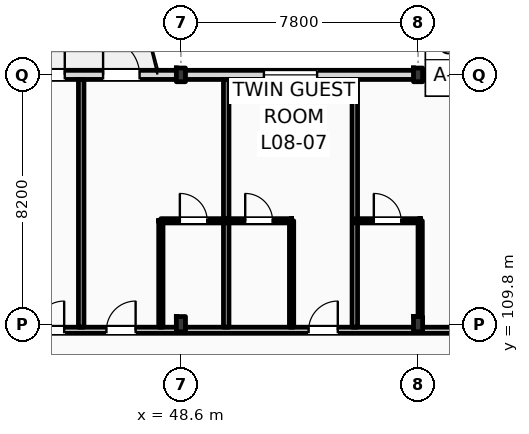
"""IFC4 building model, lengths in metres.
Left out: names, types, materials, properties, quantities, classifications, styles, units other than length and angle.
Written with IfcOpenShell. Run it as: python <this file> out.ifc"""

import sys

from ifc_helpers import new_model, si_unit, direction, frame, frame_2d, origin, origin_2d, place, context, subcontext, project, spatial, rectangle, i_section, extrude, element, fill, save


model = new_model("IFC4")
c1 = context("Model", 3, precision=1e-05, world=origin(), true_north=direction((0.0, 1.0)))
c2 = subcontext(c1, "Body", "Model", "MODEL_VIEW")
j1 = project(units=[si_unit("LENGTHUNIT", "METRE"), si_unit("PLANEANGLEUNIT", "RADIAN")], contexts=[c1])
p1 = place(None, origin())
s1 = spatial("IfcSite", under=j1, at=p1, CompositionType="ELEMENT")
p2 = place(p1, origin())
s2 = spatial("IfcBuilding", under=s1, at=p2, CompositionType="ELEMENT")
p3 = place(p2, frame((0.0, 0.0, 35.4)))
s3 = spatial("IfcBuildingStorey", under=s2, at=p3, CompositionType="ELEMENT", Elevation=35.4)
p4 = place(p3, frame((48.6, 109.8, 0.0), z_axis=(0.0, 0.0, 1.0), x_axis=(1.0, 0.0, 0.0)))
e1 = element("IfcColumn", 1, at=p4, inside=s3, PredefinedType="COLUMN", context=c2, shape_type="SweptSolid", body=[
    extrude(i_section(OverallWidth=0.3, OverallDepth=0.5, WebThickness=0.014, FlangeThickness=0.028, FilletRadius=0.027, at=origin_2d()), origin(), (0.0, 0.0, 1.0), 3.6),
])
p5 = place(p3, frame((48.6, 118.0, 0.0), z_axis=(0.0, 0.0, 1.0), x_axis=(1.0, 0.0, 0.0)))
e2 = element("IfcColumn", 2, at=p5, inside=s3, PredefinedType="COLUMN", context=c2, shape_type="SweptSolid", body=[
    extrude(i_section(OverallWidth=0.3, OverallDepth=0.45, WebThickness=0.014, FlangeThickness=0.026, FilletRadius=0.027, at=origin_2d()), origin(), (0.0, 0.0, 1.0), 3.6),
])
p6 = place(p3, frame((56.4, 109.8, 0.0), z_axis=(0.0, 0.0, 1.0), x_axis=(1.0, 0.0, 0.0)))
e3 = element("IfcColumn", 3, at=p6, inside=s3, PredefinedType="COLUMN", context=c2, shape_type="SweptSolid", body=[
    extrude(i_section(OverallWidth=0.3, OverallDepth=0.5, WebThickness=0.014, FlangeThickness=0.028, FilletRadius=0.027, at=origin_2d()), origin(), (0.0, 0.0, 1.0), 3.6),
])
p7 = place(p3, frame((56.4, 118.0, 0.0), z_axis=(0.0, 0.0, 1.0), x_axis=(1.0, 0.0, 0.0)))
e4 = element("IfcColumn", 4, at=p7, inside=s3, PredefinedType="COLUMN", context=c2, shape_type="SweptSolid", body=[
    extrude(i_section(OverallWidth=0.3, OverallDepth=0.45, WebThickness=0.014, FlangeThickness=0.026, FilletRadius=0.027, at=origin_2d()), origin(), (0.0, 0.0, 1.0), 3.6),
])
p8 = place(p3, frame((22.5, 118.0, 0.0), z_axis=(0.0, 0.0, 1.0), x_axis=(1.0, 0.0, 0.0)))
e5 = element("IfcWall", 5, at=p8, inside=s3, PredefinedType="STANDARD", context=c2, shape_type="SweptSolid", body=[
    extrude(rectangle(XDim=72.9, YDim=0.3, at=frame_2d((36.45, 0.0))), origin(), (0.0, 0.0, 1.0), 2.92),
])
p9 = place(p8, frame((0.91, 0.0, 0.9)))
e6 = element("IfcOpeningElement", 6, at=p9, cuts=e5, PredefinedType="OPENING", context=c2, shape_type="SweptSolid", body=[
    extrude(rectangle(XDim=0.9, YDim=1.84, at=frame_2d((0.45, 0.92))), frame((0.0, 0.16, 0.0), z_axis=(0.0, -1.0, 0.0), x_axis=(1.0, 0.0, 0.0)), (0.0, 0.0, 1.0), 0.32),
])
p10 = place(p8, frame((6.665, 0.0, 0.0)))
e7 = element("IfcOpeningElement", 7, at=p10, cuts=e5, PredefinedType="OPENING", context=c2, shape_type="SweptSolid", body=[
    extrude(rectangle(XDim=1.2, YDim=2.25, at=frame_2d((0.6, 1.125))), frame((0.0, 0.16, 0.0), z_axis=(0.0, -1.0, 0.0), x_axis=(1.0, 0.0, 0.0)), (0.0, 0.0, 1.0), 0.32),
])
p11 = place(p8, frame((11.355, 0.0, 0.9)))
e8 = element("IfcOpeningElement", 8, at=p11, cuts=e5, PredefinedType="OPENING", context=c2, shape_type="SweptSolid", body=[
    extrude(rectangle(XDim=1.1, YDim=1.5, at=frame_2d((0.55, 0.75))), frame((0.0, 0.16, 0.0), z_axis=(0.0, -1.0, 0.0), x_axis=(1.0, 0.0, 0.0)), (0.0, 0.0, 1.0), 0.32),
])
p12 = place(p8, frame((15.58, 0.0, 0.9)))
e9 = element("IfcOpeningElement", 9, at=p12, cuts=e5, PredefinedType="OPENING", context=c2, shape_type="SweptSolid", body=[
    extrude(rectangle(XDim=1.25, YDim=1.6, at=frame_2d((0.625, 0.8))), frame((0.0, 0.16, 0.0), z_axis=(0.0, -1.0, 0.0), x_axis=(1.0, 0.0, 0.0)), (0.0, 0.0, 1.0), 0.32),
])
p13 = place(p8, frame((21.08, 0.0, 0.0)))
e10 = element("IfcOpeningElement", 10, at=p13, cuts=e5, PredefinedType="OPENING", context=c2, shape_type="SweptSolid", body=[
    extrude(rectangle(XDim=1.2, YDim=2.25, at=frame_2d((0.6, 1.125))), frame((0.0, 0.16, 0.0), z_axis=(0.0, -1.0, 0.0), x_axis=(1.0, 0.0, 0.0)), (0.0, 0.0, 1.0), 0.32),
])
p14 = place(p8, frame((23.54, 0.0, 0.0)))
e11 = element("IfcOpeningElement", 11, at=p14, cuts=e5, PredefinedType="OPENING", context=c2, shape_type="SweptSolid", body=[
    extrude(rectangle(XDim=1.2, YDim=2.25, at=frame_2d((0.6, 1.125))), frame((0.0, 0.16, 0.0), z_axis=(0.0, -1.0, 0.0), x_axis=(1.0, 0.0, 0.0)), (0.0, 0.0, 1.0), 0.32),
])
p15 = place(p8, frame((28.83, 0.0, 0.9)))
e12 = element("IfcOpeningElement", 12, at=p15, cuts=e5, PredefinedType="OPENING", context=c2, shape_type="SweptSolid", body=[
    extrude(rectangle(XDim=1.75, YDim=1.84, at=frame_2d((0.875, 0.92))), frame((0.0, 0.16, 0.0), z_axis=(0.0, -1.0, 0.0), x_axis=(1.0, 0.0, 0.0)), (0.0, 0.0, 1.0), 0.32),
])
p16 = place(p8, frame((34.805, 0.0, 0.9)))
e13 = element("IfcOpeningElement", 13, at=p16, cuts=e5, PredefinedType="OPENING", context=c2, shape_type="SweptSolid", body=[
    extrude(rectangle(XDim=1.35, YDim=1.84, at=frame_2d((0.675, 0.92))), frame((0.0, 0.16, 0.0), z_axis=(0.0, -1.0, 0.0), x_axis=(1.0, 0.0, 0.0)), (0.0, 0.0, 1.0), 0.32),
])
p17 = place(p8, frame((38.105, 0.0, 0.0)))
e14 = element("IfcOpeningElement", 14, at=p17, cuts=e5, PredefinedType="OPENING", context=c2, shape_type="SweptSolid", body=[
    extrude(rectangle(XDim=1.2, YDim=2.25, at=frame_2d((0.6, 1.125))), frame((0.0, 0.16, 0.0), z_axis=(0.0, -1.0, 0.0), x_axis=(1.0, 0.0, 0.0)), (0.0, 0.0, 1.0), 0.32),
])
p18 = place(p8, frame((42.505, 0.0, 0.9)))
e15 = element("IfcOpeningElement", 15, at=p18, cuts=e5, PredefinedType="OPENING", context=c2, shape_type="SweptSolid", body=[
    extrude(rectangle(XDim=2.6, YDim=1.84, at=frame_2d((1.3, 0.92))), frame((0.0, 0.16, 0.0), z_axis=(0.0, -1.0, 0.0), x_axis=(1.0, 0.0, 0.0)), (0.0, 0.0, 1.0), 0.32),
])
p19 = place(p8, frame((46.2, 0.0, 0.9)))
e16 = element("IfcOpeningElement", 16, at=p19, cuts=e5, PredefinedType="OPENING", context=c2, shape_type="SweptSolid", body=[
    extrude(rectangle(XDim=1.8, YDim=1.84, at=frame_2d((0.9, 0.92))), frame((0.0, 0.16, 0.0), z_axis=(0.0, -1.0, 0.0), x_axis=(1.0, 0.0, 0.0)), (0.0, 0.0, 1.0), 0.32),
])
p20 = place(p8, frame((52.565, 0.0, 0.0)))
e17 = element("IfcOpeningElement", 17, at=p20, cuts=e5, PredefinedType="OPENING", context=c2, shape_type="SweptSolid", body=[
    extrude(rectangle(XDim=1.2, YDim=2.25, at=frame_2d((0.6, 1.125))), frame((0.0, 0.16, 0.0), z_axis=(0.0, -1.0, 0.0), x_axis=(1.0, 0.0, 0.0)), (0.0, 0.0, 1.0), 0.32),
])
p21 = place(p8, frame((55.305, 0.0, 0.9)))
e18 = element("IfcOpeningElement", 18, at=p21, cuts=e5, PredefinedType="OPENING", context=c2, shape_type="SweptSolid", body=[
    extrude(rectangle(XDim=1.2, YDim=1.8, at=frame_2d((0.6, 0.9))), frame((0.0, 0.16, 0.0), z_axis=(0.0, -1.0, 0.0), x_axis=(1.0, 0.0, 0.0)), (0.0, 0.0, 1.0), 0.32),
])
p22 = place(p8, frame((60.53, 0.0, 0.9)))
e19 = element("IfcOpeningElement", 19, at=p22, cuts=e5, PredefinedType="OPENING", context=c2, shape_type="SweptSolid", body=[
    extrude(rectangle(XDim=1.35, YDim=1.84, at=frame_2d((0.675, 0.92))), frame((0.0, 0.16, 0.0), z_axis=(0.0, -1.0, 0.0), x_axis=(1.0, 0.0, 0.0)), (0.0, 0.0, 1.0), 0.32),
])
p23 = place(p8, frame((65.955, 0.0, 0.9)))
e20 = element("IfcOpeningElement", 20, at=p23, cuts=e5, PredefinedType="OPENING", context=c2, shape_type="SweptSolid", body=[
    extrude(rectangle(XDim=1.35, YDim=1.84, at=frame_2d((0.675, 0.92))), frame((0.0, 0.16, 0.0), z_axis=(0.0, -1.0, 0.0), x_axis=(1.0, 0.0, 0.0)), (0.0, 0.0, 1.0), 0.32),
])
p24 = place(p8, frame((69.335, 0.0, 0.9)))
e21 = element("IfcOpeningElement", 21, at=p24, cuts=e5, PredefinedType="OPENING", context=c2, shape_type="SweptSolid", body=[
    extrude(rectangle(XDim=1.65, YDim=1.84, at=frame_2d((0.825, 0.92))), frame((0.0, 0.16, 0.0), z_axis=(0.0, -1.0, 0.0), x_axis=(1.0, 0.0, 0.0)), (0.0, 0.0, 1.0), 0.32),
])
p25 = place(p3, frame((10.65, 109.6, 0.0), z_axis=(0.0, 0.0, 1.0), x_axis=(1.0, 0.0, 0.0)))
e22 = element("IfcWall", 22, at=p25, inside=s3, PredefinedType="PARTITIONING", context=c2, shape_type="SweptSolid", body=[
    extrude(rectangle(XDim=84.61, YDim=0.2, at=frame_2d((42.305, 0.0))), origin(), (0.0, 0.0, 1.0), 2.82),
])
p26 = place(p25, frame((12.675, 0.0, 0.0)))
e23 = element("IfcOpeningElement", 23, at=p26, cuts=e22, PredefinedType="OPENING", context=c2, shape_type="SweptSolid", body=[
    extrude(rectangle(XDim=1.02, YDim=2.2, at=frame_2d((0.51, 1.1))), frame((0.0, 0.11, 0.0), z_axis=(0.0, -1.0, 0.0), x_axis=(1.0, 0.0, 0.0)), (0.0, 0.0, 1.0), 0.22),
])
p27 = place(p25, frame((19.62, 0.0, 0.0)))
e24 = element("IfcOpeningElement", 24, at=p27, cuts=e22, PredefinedType="OPENING", context=c2, shape_type="SweptSolid", body=[
    extrude(rectangle(XDim=1.02, YDim=2.2, at=frame_2d((0.51, 1.1))), frame((0.0, 0.11, 0.0), z_axis=(0.0, -1.0, 0.0), x_axis=(1.0, 0.0, 0.0)), (0.0, 0.0, 1.0), 0.22),
])
p28 = place(p25, frame((24.12, 0.0, 0.0)))
e25 = element("IfcOpeningElement", 25, at=p28, cuts=e22, PredefinedType="OPENING", context=c2, shape_type="SweptSolid", body=[
    extrude(rectangle(XDim=1.02, YDim=2.2, at=frame_2d((0.51, 1.1))), frame((0.0, 0.11, 0.0), z_axis=(0.0, -1.0, 0.0), x_axis=(1.0, 0.0, 0.0)), (0.0, 0.0, 1.0), 0.22),
])
p29 = place(p25, frame((26.47, 0.0, 0.0)))
e26 = element("IfcOpeningElement", 26, at=p29, cuts=e22, PredefinedType="OPENING", context=c2, shape_type="SweptSolid", body=[
    extrude(rectangle(XDim=1.02, YDim=2.2, at=frame_2d((0.51, 1.1))), frame((0.0, 0.11, 0.0), z_axis=(0.0, -1.0, 0.0), x_axis=(1.0, 0.0, 0.0)), (0.0, 0.0, 1.0), 0.22),
])
p30 = place(p25, frame((33.15, 0.0, 0.0)))
e27 = element("IfcOpeningElement", 27, at=p30, cuts=e22, PredefinedType="OPENING", context=c2, shape_type="SweptSolid", body=[
    extrude(rectangle(XDim=0.96, YDim=2.2, at=frame_2d((0.48, 1.1))), frame((0.0, 0.11, 0.0), z_axis=(0.0, -1.0, 0.0), x_axis=(1.0, 0.0, 0.0)), (0.0, 0.0, 1.0), 0.22),
])
p31 = place(p25, frame((35.5, 0.0, 0.0)))
e28 = element("IfcOpeningElement", 28, at=p31, cuts=e22, PredefinedType="OPENING", context=c2, shape_type="SweptSolid", body=[
    extrude(rectangle(XDim=0.96, YDim=2.2, at=frame_2d((0.48, 1.1))), frame((0.0, 0.11, 0.0), z_axis=(0.0, -1.0, 0.0), x_axis=(1.0, 0.0, 0.0)), (0.0, 0.0, 1.0), 0.22),
])
p32 = place(p25, frame((42.15, 0.0, 0.0)))
e29 = element("IfcOpeningElement", 29, at=p32, cuts=e22, PredefinedType="OPENING", context=c2, shape_type="SweptSolid", body=[
    extrude(rectangle(XDim=0.96, YDim=2.2, at=frame_2d((0.48, 1.1))), frame((0.0, 0.11, 0.0), z_axis=(0.0, -1.0, 0.0), x_axis=(1.0, 0.0, 0.0)), (0.0, 0.0, 1.0), 0.22),
])
p33 = place(p25, frame((47.15, 0.0, 0.0)))
e30 = element("IfcOpeningElement", 30, at=p33, cuts=e22, PredefinedType="OPENING", context=c2, shape_type="SweptSolid", body=[
    extrude(rectangle(XDim=0.96, YDim=2.2, at=frame_2d((0.48, 1.1))), frame((0.0, 0.11, 0.0), z_axis=(0.0, -1.0, 0.0), x_axis=(1.0, 0.0, 0.0)), (0.0, 0.0, 1.0), 0.22),
])
p34 = place(p25, frame((51.15, 0.0, 0.0)))
e31 = element("IfcOpeningElement", 31, at=p34, cuts=e22, PredefinedType="OPENING", context=c2, shape_type="SweptSolid", body=[
    extrude(rectangle(XDim=0.96, YDim=2.2, at=frame_2d((0.48, 1.1))), frame((0.0, 0.11, 0.0), z_axis=(0.0, -1.0, 0.0), x_axis=(1.0, 0.0, 0.0)), (0.0, 0.0, 1.0), 0.22),
])
p35 = place(p25, frame((55.65, 0.0, 0.0)))
e32 = element("IfcOpeningElement", 32, at=p35, cuts=e22, PredefinedType="OPENING", context=c2, shape_type="SweptSolid", body=[
    extrude(rectangle(XDim=0.96, YDim=2.2, at=frame_2d((0.48, 1.1))), frame((0.0, 0.11, 0.0), z_axis=(0.0, -1.0, 0.0), x_axis=(1.0, 0.0, 0.0)), (0.0, 0.0, 1.0), 0.22),
])
p36 = place(p25, frame((58.0, 0.0, 0.0)))
e33 = element("IfcOpeningElement", 33, at=p36, cuts=e22, PredefinedType="OPENING", context=c2, shape_type="SweptSolid", body=[
    extrude(rectangle(XDim=0.96, YDim=2.2, at=frame_2d((0.48, 1.1))), frame((0.0, 0.11, 0.0), z_axis=(0.0, -1.0, 0.0), x_axis=(1.0, 0.0, 0.0)), (0.0, 0.0, 1.0), 0.22),
])
p37 = place(p25, frame((64.65, 0.0, 0.0)))
e34 = element("IfcOpeningElement", 34, at=p37, cuts=e22, PredefinedType="OPENING", context=c2, shape_type="SweptSolid", body=[
    extrude(rectangle(XDim=0.96, YDim=2.2, at=frame_2d((0.48, 1.1))), frame((0.0, 0.11, 0.0), z_axis=(0.0, -1.0, 0.0), x_axis=(1.0, 0.0, 0.0)), (0.0, 0.0, 1.0), 0.22),
])
p38 = place(p25, frame((66.75, 0.0, 0.0)))
e35 = element("IfcOpeningElement", 35, at=p38, cuts=e22, PredefinedType="OPENING", context=c2, shape_type="SweptSolid", body=[
    extrude(rectangle(XDim=0.96, YDim=2.2, at=frame_2d((0.48, 1.1))), frame((0.0, 0.11, 0.0), z_axis=(0.0, -1.0, 0.0), x_axis=(1.0, 0.0, 0.0)), (0.0, 0.0, 1.0), 0.22),
])
p39 = place(p25, frame((73.65, 0.0, 0.0)))
e36 = element("IfcOpeningElement", 36, at=p39, cuts=e22, PredefinedType="OPENING", context=c2, shape_type="SweptSolid", body=[
    extrude(rectangle(XDim=0.96, YDim=2.2, at=frame_2d((0.48, 1.1))), frame((0.0, 0.11, 0.0), z_axis=(0.0, -1.0, 0.0), x_axis=(1.0, 0.0, 0.0)), (0.0, 0.0, 1.0), 0.22),
])
p40 = place(p25, frame((78.4, 0.0, 0.0)))
e37 = element("IfcOpeningElement", 37, at=p40, cuts=e22, PredefinedType="OPENING", context=c2, shape_type="SweptSolid", body=[
    extrude(rectangle(XDim=0.96, YDim=2.2, at=frame_2d((0.48, 1.1))), frame((0.0, 0.11, 0.0), z_axis=(0.0, -1.0, 0.0), x_axis=(1.0, 0.0, 0.0)), (0.0, 0.0, 1.0), 0.22),
])
p41 = place(p25, frame((80.455, 0.0, 0.0)))
e38 = element("IfcOpeningElement", 38, at=p41, cuts=e22, PredefinedType="OPENING", context=c2, shape_type="SweptSolid", body=[
    extrude(rectangle(XDim=0.96, YDim=2.2, at=frame_2d((0.48, 1.1))), frame((0.0, 0.11, 0.0), z_axis=(0.0, -1.0, 0.0), x_axis=(1.0, 0.0, 0.0)), (0.0, 0.0, 1.0), 0.22),
])
p42 = place(p25, frame((2.716, 0.0, 0.0)))
e39 = element("IfcOpeningElement", 39, at=p42, cuts=e22, PredefinedType="OPENING", context=c2, shape_type="SweptSolid", body=[
    extrude(rectangle(XDim=1.35, YDim=2.25, at=frame_2d((0.675, 1.125))), frame((0.0, 0.11, 0.0), z_axis=(0.0, -1.0, 0.0), x_axis=(1.0, 0.0, 0.0)), (0.0, 0.0, 1.0), 0.22),
])
p43 = place(p25, frame((6.65, 0.0, 0.0)))
e40 = element("IfcOpeningElement", 40, at=p43, cuts=e22, PredefinedType="OPENING", context=c2, shape_type="SweptSolid", body=[
    extrude(rectangle(XDim=1.35, YDim=2.25, at=frame_2d((0.675, 1.125))), frame((0.0, 0.11, 0.0), z_axis=(0.0, -1.0, 0.0), x_axis=(1.0, 0.0, 0.0)), (0.0, 0.0, 1.0), 0.22),
])
p44 = place(p25, frame((10.583, 0.0, 0.0)))
e41 = element("IfcOpeningElement", 41, at=p44, cuts=e22, PredefinedType="OPENING", context=c2, shape_type="SweptSolid", body=[
    extrude(rectangle(XDim=1.35, YDim=2.25, at=frame_2d((0.675, 1.125))), frame((0.0, 0.11, 0.0), z_axis=(0.0, -1.0, 0.0), x_axis=(1.0, 0.0, 0.0)), (0.0, 0.0, 1.0), 0.22),
])
for number, where, z_axis, x_axis in (
    (42, (45.32, 109.7, 0.0), (0.0, 0.0, 1.0), (0.0, 1.0, 0.0)),
    (43, (50.09, 109.7, 0.0), (0.0, 0.0, 1.0), (0.0, 1.0, 0.0)),
):
    element("IfcWall", number, at=place(p3, frame(where, z_axis=z_axis, x_axis=x_axis)), inside=s3, PredefinedType="PARTITIONING", context=c2, shape_type="SweptSolid", body=[
        extrude(rectangle(XDim=8.15, YDim=0.18, at=frame_2d((4.075, 0.0))), origin(), (0.0, 0.0, 1.0), 3.38),
    ])
p45 = place(p3, frame((47.94, 109.7, 0.0), z_axis=(0.0, 0.0, 1.0), x_axis=(0.0, 1.0, 0.0)))
e44 = element("IfcWall", 44, at=p45, inside=s3, PredefinedType="PARTITIONING", context=c2, shape_type="SweptSolid", body=[
    extrude(rectangle(XDim=3.5, YDim=0.14, at=frame_2d((1.75, 0.0))), origin(), (0.0, 0.0, 1.0), 3.38),
])
p46 = place(p3, frame((47.94, 113.2, 0.0), z_axis=(0.0, 0.0, 1.0), x_axis=(1.0, 0.0, 0.0)))
e45 = element("IfcWall", 45, at=p46, inside=s3, PredefinedType="PARTITIONING", context=c2, shape_type="SweptSolid", body=[
    extrude(rectangle(XDim=2.15, YDim=0.14, at=frame_2d((1.075, 0.0))), origin(), (0.0, 0.0, 1.0), 3.38),
])
p47 = place(p46, frame((0.625, 0.0, 0.0)))
e46 = element("IfcOpeningElement", 46, at=p47, cuts=e45, PredefinedType="OPENING", context=c2, shape_type="SweptSolid", body=[
    extrude(rectangle(XDim=0.9, YDim=2.1, at=frame_2d((0.45, 1.05))), frame((0.0, 0.08, 0.0), z_axis=(0.0, -1.0, 0.0), x_axis=(1.0, 0.0, 0.0)), (0.0, 0.0, 1.0), 0.16),
])
p48 = place(p3, frame((54.32, 109.7, 0.0), z_axis=(0.0, 0.0, 1.0), x_axis=(0.0, 1.0, 0.0)))
e47 = element("IfcWall", 47, at=p48, inside=s3, PredefinedType="PARTITIONING", context=c2, shape_type="SweptSolid", body=[
    extrude(rectangle(XDim=8.15, YDim=0.18, at=frame_2d((4.075, 0.0))), origin(), (0.0, 0.0, 1.0), 3.38),
])
p49 = place(p3, frame((52.24, 109.7, 0.0), z_axis=(0.0, 0.0, 1.0), x_axis=(0.0, 1.0, 0.0)))
e48 = element("IfcWall", 48, at=p49, inside=s3, PredefinedType="PARTITIONING", context=c2, shape_type="SweptSolid", body=[
    extrude(rectangle(XDim=3.5, YDim=0.14, at=frame_2d((1.75, 0.0))), origin(), (0.0, 0.0, 1.0), 3.38),
])
p50 = place(p3, frame((50.09, 113.2, 0.0), z_axis=(0.0, 0.0, 1.0), x_axis=(1.0, 0.0, 0.0)))
e49 = element("IfcWall", 49, at=p50, inside=s3, PredefinedType="PARTITIONING", context=c2, shape_type="SweptSolid", body=[
    extrude(rectangle(XDim=2.15, YDim=0.14, at=frame_2d((1.075, 0.0))), origin(), (0.0, 0.0, 1.0), 3.38),
])
p51 = place(p50, frame((0.625, 0.0, 0.0)))
e50 = element("IfcOpeningElement", 50, at=p51, cuts=e49, PredefinedType="OPENING", context=c2, shape_type="SweptSolid", body=[
    extrude(rectangle(XDim=0.9, YDim=2.1, at=frame_2d((0.45, 1.05))), frame((0.0, 0.08, 0.0), z_axis=(0.0, -1.0, 0.0), x_axis=(1.0, 0.0, 0.0)), (0.0, 0.0, 1.0), 0.16),
])
p52 = place(p3, frame((56.47, 109.7, 0.0), z_axis=(0.0, 0.0, 1.0), x_axis=(0.0, 1.0, 0.0)))
e51 = element("IfcWall", 51, at=p52, inside=s3, PredefinedType="PARTITIONING", context=c2, shape_type="SweptSolid", body=[
    extrude(rectangle(XDim=3.5, YDim=0.14, at=frame_2d((1.75, 0.0))), origin(), (0.0, 0.0, 1.0), 3.01),
])
p53 = place(p3, frame((54.32, 113.2, 0.0), z_axis=(0.0, 0.0, 1.0), x_axis=(1.0, 0.0, 0.0)))
e52 = element("IfcWall", 52, at=p53, inside=s3, PredefinedType="PARTITIONING", context=c2, shape_type="SweptSolid", body=[
    extrude(rectangle(XDim=2.15, YDim=0.14, at=frame_2d((1.075, 0.0))), origin(), (0.0, 0.0, 1.0), 3.38),
])
p54 = place(p53, frame((0.625, 0.0, 0.0)))
e53 = element("IfcOpeningElement", 53, at=p54, cuts=e52, PredefinedType="OPENING", context=c2, shape_type="SweptSolid", body=[
    extrude(rectangle(XDim=0.9, YDim=2.1, at=frame_2d((0.45, 1.05))), frame((0.0, 0.08, 0.0), z_axis=(0.0, -1.0, 0.0), x_axis=(1.0, 0.0, 0.0)), (0.0, 0.0, 1.0), 0.16),
])
p55 = place(p13, origin())
e54 = element("IfcDoor", 54, at=p55, inside=s3, OperationType="SINGLE_SWING_RIGHT", PredefinedType="DOOR", context=c2, shape_type="SweptSolid", body=[
    extrude(rectangle(XDim=1.2, YDim=2.25, at=frame_2d((0.6, 1.125))), frame((0.0, 0.025, 0.0), z_axis=(0.0, -1.0, 0.0), x_axis=(1.0, 0.0, 0.0)), (0.0, 0.0, 1.0), 0.05),
])
fill(e10, e54)
p56 = place(p14, origin())
e55 = element("IfcDoor", 55, at=p56, inside=s3, OperationType="SINGLE_SWING_LEFT", PredefinedType="DOOR", context=c2, shape_type="SweptSolid", body=[
    extrude(rectangle(XDim=1.2, YDim=2.25, at=frame_2d((0.6, 1.125))), frame((0.0, 0.025, 0.0), z_axis=(0.0, -1.0, 0.0), x_axis=(1.0, 0.0, 0.0)), (0.0, 0.0, 1.0), 0.05),
])
fill(e11, e55)
p57 = place(p15, origin())
e56 = element("IfcWindow", 56, at=p57, inside=s3, PartitioningType="DOUBLE_PANEL_VERTICAL", PredefinedType="WINDOW", context=c2, shape_type="SweptSolid", body=[
    extrude(rectangle(XDim=1.75, YDim=1.84, at=frame_2d((0.875, 0.92))), frame((0.0, 0.03, 0.0), z_axis=(0.0, -1.0, 0.0), x_axis=(1.0, 0.0, 0.0)), (0.0, 0.0, 1.0), 0.06),
])
fill(e12, e56)
p58 = place(p16, origin())
e57 = element("IfcWindow", 57, at=p58, inside=s3, PartitioningType="DOUBLE_PANEL_VERTICAL", PredefinedType="WINDOW", context=c2, shape_type="SweptSolid", body=[
    extrude(rectangle(XDim=1.35, YDim=1.84, at=frame_2d((0.675, 0.92))), frame((0.0, 0.03, 0.0), z_axis=(0.0, -1.0, 0.0), x_axis=(1.0, 0.0, 0.0)), (0.0, 0.0, 1.0), 0.06),
])
fill(e13, e57)
p59 = place(p30, origin())
e58 = element("IfcDoor", 58, at=p59, inside=s3, OperationType="SINGLE_SWING_RIGHT", PredefinedType="DOOR", context=c2, shape_type="SweptSolid", body=[
    extrude(rectangle(XDim=0.96, YDim=2.2, at=frame_2d((0.48, 1.1))), frame((0.0, 0.025, 0.0), z_axis=(0.0, -1.0, 0.0), x_axis=(1.0, 0.0, 0.0)), (0.0, 0.0, 1.0), 0.05),
])
fill(e27, e58)
p60 = place(p31, origin())
e59 = element("IfcDoor", 59, at=p60, inside=s3, OperationType="SINGLE_SWING_RIGHT", PredefinedType="DOOR", context=c2, shape_type="SweptSolid", body=[
    extrude(rectangle(XDim=0.96, YDim=2.2, at=frame_2d((0.48, 1.1))), frame((0.0, 0.025, 0.0), z_axis=(0.0, -1.0, 0.0), x_axis=(1.0, 0.0, 0.0)), (0.0, 0.0, 1.0), 0.05),
])
fill(e28, e59)
p61 = place(p47, origin())
e60 = element("IfcDoor", 60, at=p61, inside=s3, OperationType="SINGLE_SWING_LEFT", PredefinedType="DOOR", context=c2, shape_type="SweptSolid", body=[
    extrude(rectangle(XDim=0.9, YDim=2.1, at=frame_2d((0.45, 1.05))), frame((0.0, 0.025, 0.0), z_axis=(0.0, -1.0, 0.0), x_axis=(1.0, 0.0, 0.0)), (0.0, 0.0, 1.0), 0.05),
])
fill(e46, e60)
p62 = place(p32, origin())
e61 = element("IfcDoor", 61, at=p62, inside=s3, OperationType="SINGLE_SWING_RIGHT", PredefinedType="DOOR", context=c2, shape_type="SweptSolid", body=[
    extrude(rectangle(XDim=0.96, YDim=2.2, at=frame_2d((0.48, 1.1))), frame((0.0, 0.025, 0.0), z_axis=(0.0, -1.0, 0.0), x_axis=(1.0, 0.0, 0.0)), (0.0, 0.0, 1.0), 0.05),
])
fill(e29, e61)
p63 = place(p51, origin())
e62 = element("IfcDoor", 62, at=p63, inside=s3, OperationType="SINGLE_SWING_LEFT", PredefinedType="DOOR", context=c2, shape_type="SweptSolid", body=[
    extrude(rectangle(XDim=0.9, YDim=2.1, at=frame_2d((0.45, 1.05))), frame((0.0, 0.025, 0.0), z_axis=(0.0, -1.0, 0.0), x_axis=(1.0, 0.0, 0.0)), (0.0, 0.0, 1.0), 0.05),
])
fill(e50, e62)
p64 = place(p54, origin())
e63 = element("IfcDoor", 63, at=p64, inside=s3, OperationType="SINGLE_SWING_LEFT", PredefinedType="DOOR", context=c2, shape_type="SweptSolid", body=[
    extrude(rectangle(XDim=0.9, YDim=2.1, at=frame_2d((0.45, 1.05))), frame((0.0, 0.025, 0.0), z_axis=(0.0, -1.0, 0.0), x_axis=(1.0, 0.0, 0.0)), (0.0, 0.0, 1.0), 0.05),
])
fill(e53, e63)
save(model, sys.argv[1])
